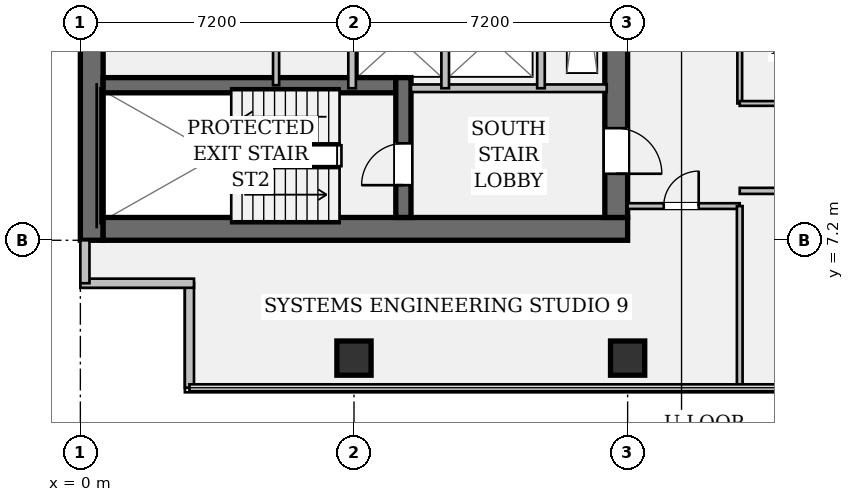
"""IFC4 building model, lengths in metres.
Left out: names, types, materials, properties, quantities, classifications, styles, units other than length and angle.
Written with IfcOpenShell. Run it as: python <this file> out.ifc"""

import sys

from ifc_helpers import new_model, si_unit, direction, frame, frame_2d, origin, origin_2d, place, context, subcontext, project, spatial, rectangle, hollow_rectangle, extrude, element, fill, save


model = new_model("IFC4")
c1 = context("Model", 3, precision=1e-05, world=origin(), true_north=direction((0.0, 1.0)))
c2 = subcontext(c1, "Body", "Model", "MODEL_VIEW")
j1 = project(units=[si_unit("LENGTHUNIT", "METRE"), si_unit("PLANEANGLEUNIT", "RADIAN")], contexts=[c1])
p1 = place(None, origin())
s1 = spatial("IfcSite", under=j1, at=p1, CompositionType="ELEMENT")
p2 = place(p1, origin())
s2 = spatial("IfcBuilding", under=s1, at=p2, CompositionType="ELEMENT")
p3 = place(p2, frame((0.0, 0.0, 125.3)))
s3 = spatial("IfcBuildingStorey", under=s2, at=p3, CompositionType="ELEMENT", Elevation=125.3)
p4 = place(p3, frame((0.3, 7.2, 0.0), z_axis=(0.0, 0.0, 1.0), x_axis=(0.0, 1.0, 0.0)))
e1 = element("IfcWall", 1, at=p4, inside=s3, PredefinedType="SHEAR", context=c2, shape_type="SweptSolid", body=[
    extrude(rectangle(XDim=28.8, YDim=0.6, at=frame_2d((14.4, 0.0))), origin(), (0.0, 0.0, 1.0), 3.58),
])
p5 = place(p3, frame((0.6, 7.5, 0.0), z_axis=(0.0, 0.0, 1.0), x_axis=(1.0, 0.0, 0.0)))
e2 = element("IfcWall", 2, at=p5, inside=s3, PredefinedType="SHEAR", context=c2, shape_type="SweptSolid", body=[
    extrude(rectangle(XDim=13.8, YDim=0.6, at=frame_2d((6.9, 0.0))), origin(), (0.0, 0.0, 1.0), 3.58),
])
p6 = place(p3, frame((14.1, 35.4, 0.0), z_axis=(0.0, 0.0, 1.0), x_axis=(0.0, -1.0, 0.0)))
e3 = element("IfcWall", 3, at=p6, inside=s3, PredefinedType="SHEAR", context=c2, shape_type="SweptSolid", body=[
    extrude(rectangle(XDim=27.6, YDim=0.6, at=frame_2d((13.8, 0.0))), origin(), (0.0, 0.0, 1.0), 3.58),
])
p7 = place(p6, frame((1.3, 0.0, 0.0)))
e4 = element("IfcOpeningElement", 4, at=p7, cuts=e3, PredefinedType="OPENING", context=c2, shape_type="SweptSolid", body=[
    extrude(rectangle(XDim=1.2, YDim=2.15, at=frame_2d((0.6, 1.075))), frame((0.0, 0.312, 0.0), z_axis=(0.0, -1.0, 0.0), x_axis=(1.0, 0.0, 0.0)), (0.0, 0.0, 1.0), 0.624),
])
p8 = place(p6, frame((25.25, 0.0, 0.0)))
e5 = element("IfcOpeningElement", 5, at=p8, cuts=e3, PredefinedType="OPENING", context=c2, shape_type="SweptSolid", body=[
    extrude(rectangle(XDim=1.2, YDim=2.15, at=frame_2d((0.6, 1.075))), frame((0.0, 0.312, 0.0), z_axis=(0.0, -1.0, 0.0), x_axis=(1.0, 0.0, 0.0)), (0.0, 0.0, 1.0), 0.624),
])
p9 = place(p6, frame((14.6, 0.0, 0.0)))
e6 = element("IfcOpeningElement", 6, at=p9, cuts=e3, PredefinedType="OPENING", context=c2, shape_type="SweptSolid", body=[
    extrude(rectangle(XDim=1.6, YDim=2.2, at=frame_2d((0.8, 1.1))), frame((0.0, 0.312, 0.0), z_axis=(0.0, -1.0, 0.0), x_axis=(1.0, 0.0, 0.0)), (0.0, 0.0, 1.0), 0.624),
])
p10 = place(p3, frame((0.6, 11.28, 0.0), z_axis=(0.0, 0.0, 1.0), x_axis=(1.0, 0.0, 0.0)))
e7 = element("IfcWall", 7, at=p10, inside=s3, PredefinedType="SHEAR", context=c2, shape_type="SweptSolid", body=[
    extrude(rectangle(XDim=7.7, YDim=0.4, at=frame_2d((3.85, 0.0))), origin(), (0.0, 0.0, 1.0), 3.58),
])
p11 = place(p3, frame((8.5, 7.8, 0.0), z_axis=(0.0, 0.0, 1.0), x_axis=(0.0, 1.0, 0.0)))
e8 = element("IfcWall", 8, at=p11, inside=s3, PredefinedType="SHEAR", context=c2, shape_type="SweptSolid", body=[
    extrude(rectangle(XDim=3.68, YDim=0.4, at=frame_2d((1.84, 0.0))), origin(), (0.0, 0.0, 1.0), 3.58),
])
p12 = place(p11, frame((0.85, 0.0, 0.0)))
e9 = element("IfcOpeningElement", 9, at=p12, cuts=e8, PredefinedType="OPENING", context=c2, shape_type="SweptSolid", body=[
    extrude(rectangle(XDim=1.1, YDim=2.15, at=frame_2d((0.55, 1.075))), frame((0.0, 0.212, 0.0), z_axis=(0.0, -1.0, 0.0), x_axis=(1.0, 0.0, 0.0)), (0.0, 0.0, 1.0), 0.424),
])
for number, where, z_axis, x_axis in (
    (10, (7.2, 4.1, 0.0), (0.0, 0.0, 1.0), (1.0, 0.0, 0.0)),
    (11, (14.4, 4.1, 0.0), (0.0, 0.0, 1.0), (1.0, 0.0, 0.0)),
):
    element("IfcColumn", number, at=place(p3, frame(where, z_axis=z_axis, x_axis=x_axis)), inside=s3, PredefinedType="COLUMN", context=c2, shape_type="SweptSolid", body=[
        extrude(hollow_rectangle(XDim=0.9, YDim=0.9, WallThickness=0.055, at=origin_2d()), origin(), (0.0, 0.0, 1.0), 3.58),
    ])
p13 = place(p3, frame((2.87, 3.32, 0.0), z_axis=(0.0, 0.0, 1.0), x_axis=(0.0, 1.0, 0.0)))
e12 = element("IfcWall", 12, at=p13, inside=s3, PredefinedType="STANDARD", context=c2, shape_type="SweptSolid", body=[
    extrude(rectangle(XDim=2.75, YDim=0.24, at=frame_2d((1.375, 0.0))), origin(), (0.0, 0.0, 1.0), 3.58),
])
p14 = place(p3, frame((2.99, 6.07, 0.0), z_axis=(0.0, 0.0, 1.0), x_axis=(-1.0, 0.0, 0.0)))
e13 = element("IfcWall", 13, at=p14, inside=s3, PredefinedType="STANDARD", context=c2, shape_type="SweptSolid", body=[
    extrude(rectangle(XDim=2.99, YDim=0.24, at=frame_2d((1.495, 0.0))), origin(), (0.0, 0.0, 1.0), 3.58),
])
p15 = place(p3, frame((0.12, 6.07, 0.0), z_axis=(0.0, 0.0, 1.0), x_axis=(0.0, 1.0, 0.0)))
e14 = element("IfcWall", 14, at=p15, inside=s3, PredefinedType="STANDARD", context=c2, shape_type="SweptSolid", body=[
    extrude(rectangle(XDim=1.13, YDim=0.24, at=frame_2d((0.565, 0.0))), origin(), (0.0, 0.0, 1.0), 3.58),
])
p16 = place(p3, frame((8.7, 11.2, 0.0), z_axis=(0.0, 0.0, 1.0), x_axis=(1.0, 0.0, 0.0)))
e15 = element("IfcWall", 15, at=p16, inside=s3, PredefinedType="PARTITIONING", context=c2, shape_type="SweptSolid", body=[
    extrude(rectangle(XDim=5.15, YDim=0.2, at=frame_2d((2.575, 0.0))), origin(), (0.0, 0.0, 1.0), 3.58),
])
for number, where, z_axis, x_axis in (
    (16, (7.15, 11.2, 0.0), (0.0, 0.0, 1.0), (0.0, 1.0, 0.0)),
    (17, (9.6, 11.2, 0.0), (0.0, 0.0, 1.0), (0.0, 1.0, 0.0)),
):
    element("IfcWall", number, at=place(p3, frame(where, z_axis=z_axis, x_axis=x_axis)), inside=s3, PredefinedType="PARTITIONING", context=c2, shape_type="SweptSolid", body=[
        extrude(rectangle(XDim=2.4, YDim=0.2, at=frame_2d((1.2, 0.0))), origin(), (0.0, 0.0, 1.0), 3.58),
    ])
p17 = place(p3, frame((12.12, 11.2, 0.0), z_axis=(0.0, 0.0, 1.0), x_axis=(0.0, 1.0, 0.0)))
e18 = element("IfcWall", 18, at=p17, inside=s3, PredefinedType="PARTITIONING", context=c2, shape_type="SweptSolid", body=[
    extrude(rectangle(XDim=6.6, YDim=0.2, at=frame_2d((3.3, 0.0))), origin(), (0.0, 0.0, 1.0), 3.58),
])
p18 = place(p17, frame((2.95, 0.0, 0.0)))
e19 = element("IfcOpeningElement", 19, at=p18, cuts=e18, PredefinedType="OPENING", context=c2, shape_type="SweptSolid", body=[
    extrude(rectangle(XDim=0.85, YDim=2.15, at=frame_2d((0.425, 1.075))), frame((0.0, 0.112, 0.0), z_axis=(0.0, -1.0, 0.0), x_axis=(1.0, 0.0, 0.0)), (0.0, 0.0, 1.0), 0.224),
])
p19 = place(p3, frame((5.15, 11.28, 0.0), z_axis=(0.0, 0.0, 1.0), x_axis=(0.0, 1.0, 0.0)))
e20 = element("IfcWall", 20, at=p19, inside=s3, PredefinedType="PARTITIONING", context=c2, shape_type="SweptSolid", body=[
    extrude(rectangle(XDim=4.42, YDim=0.16, at=frame_2d((2.21, 0.0))), origin(), (0.0, 0.0, 1.0), 3.58),
])
p20 = place(p3, frame((14.4, 8.1, 0.0), z_axis=(0.0, 0.0, 1.0), x_axis=(1.0, 0.0, 0.0)))
e21 = element("IfcWall", 21, at=p20, inside=s3, PredefinedType="PARTITIONING", context=c2, shape_type="SweptSolid", body=[
    extrude(rectangle(XDim=2.95, YDim=0.15, at=frame_2d((1.475, 0.0))), origin(), (0.0, 0.0, 1.0), 3.098),
])
p21 = place(p20, frame((0.95, 0.0, 0.0)))
e22 = element("IfcOpeningElement", 22, at=p21, cuts=e21, PredefinedType="OPENING", context=c2, shape_type="SweptSolid", body=[
    extrude(rectangle(XDim=0.92, YDim=2.15, at=frame_2d((0.46, 1.075))), frame((0.0, 0.087, 0.0), z_axis=(0.0, -1.0, 0.0), x_axis=(1.0, 0.0, 0.0)), (0.0, 0.0, 1.0), 0.174),
])
p22 = place(p3, frame((17.35, 8.5, 0.0), z_axis=(0.0, 0.0, 1.0), x_axis=(1.0, 0.0, 0.0)))
e23 = element("IfcWall", 23, at=p22, inside=s3, PredefinedType="PARTITIONING", context=c2, shape_type="SweptSolid", body=[
    extrude(rectangle(XDim=24.15, YDim=0.16, at=frame_2d((12.075, 0.0))), origin(), (0.0, 0.0, 1.0), 2.869),
])
p23 = place(p22, frame((5.23, 0.0, 0.0)))
e24 = element("IfcOpeningElement", 24, at=p23, cuts=e23, PredefinedType="OPENING", context=c2, shape_type="SweptSolid", body=[
    extrude(rectangle(XDim=0.92, YDim=2.15, at=frame_2d((0.46, 1.075))), frame((0.0, 0.092, 0.0), z_axis=(0.0, -1.0, 0.0), x_axis=(1.0, 0.0, 0.0)), (0.0, 0.0, 1.0), 0.184),
])
p24 = place(p22, frame((16.82, 0.0, 0.0)))
e25 = element("IfcOpeningElement", 25, at=p24, cuts=e23, PredefinedType="OPENING", context=c2, shape_type="SweptSolid", body=[
    extrude(rectangle(XDim=0.92, YDim=2.15, at=frame_2d((0.46, 1.075))), frame((0.0, 0.092, 0.0), z_axis=(0.0, -1.0, 0.0), x_axis=(1.0, 0.0, 0.0)), (0.0, 0.0, 1.0), 0.184),
])
p25 = place(p3, frame((17.35, 10.8, 0.0), z_axis=(0.0, 0.0, 1.0), x_axis=(0.0, 1.0, 0.0)))
e26 = element("IfcWall", 26, at=p25, inside=s3, PredefinedType="PARTITIONING", context=c2, shape_type="SweptSolid", body=[
    extrude(rectangle(XDim=7.55, YDim=0.125, at=frame_2d((3.775, 0.0))), origin(), (0.0, 0.0, 1.0), 2.869),
])
p26 = place(p3, frame((17.35, 10.8, 0.0), z_axis=(0.0, 0.0, 1.0), x_axis=(1.0, 0.0, 0.0)))
e27 = element("IfcWall", 27, at=p26, inside=s3, PredefinedType="PARTITIONING", context=c2, shape_type="SweptSolid", body=[
    extrude(rectangle(XDim=21.8, YDim=0.125, at=frame_2d((10.9, 0.0))), origin(), (0.0, 0.0, 1.0), 2.869),
])
p27 = place(p3, frame((17.35, 3.32, 0.0), z_axis=(0.0, 0.0, 1.0), x_axis=(0.0, 1.0, 0.0)))
e28 = element("IfcWall", 28, at=p27, inside=s3, PredefinedType="PARTITIONING", context=c2, shape_type="SweptSolid", body=[
    extrude(rectangle(XDim=4.78, YDim=0.15, at=frame_2d((2.39, 0.0))), origin(), (0.0, 0.0, 1.0), 2.869),
])
p28 = place(p12, origin())
e29 = element("IfcDoor", 29, at=p28, inside=s3, OperationType="SINGLE_SWING_LEFT", PredefinedType="DOOR", context=c2, shape_type="SweptSolid", body=[
    extrude(rectangle(XDim=1.1, YDim=2.15, at=frame_2d((0.55, 1.075))), frame((0.0, 0.025, 0.0), z_axis=(0.0, -1.0, 0.0), x_axis=(1.0, 0.0, 0.0)), (0.0, 0.0, 1.0), 0.05),
])
fill(e9, e29)
p29 = place(p8, origin())
e30 = element("IfcDoor", 30, at=p29, inside=s3, OperationType="SINGLE_SWING_RIGHT", PredefinedType="DOOR", context=c2, shape_type="SweptSolid", body=[
    extrude(rectangle(XDim=1.2, YDim=2.15, at=frame_2d((0.6, 1.075))), frame((0.0, 0.025, 0.0), z_axis=(0.0, -1.0, 0.0), x_axis=(1.0, 0.0, 0.0)), (0.0, 0.0, 1.0), 0.05),
])
fill(e5, e30)
p30 = place(p21, origin())
e31 = element("IfcDoor", 31, at=p30, inside=s3, OperationType="SINGLE_SWING_RIGHT", PredefinedType="DOOR", context=c2, shape_type="SweptSolid", body=[
    extrude(rectangle(XDim=0.92, YDim=2.15, at=frame_2d((0.46, 1.075))), frame((0.0, 0.025, 0.0), z_axis=(0.0, -1.0, 0.0), x_axis=(1.0, 0.0, 0.0)), (0.0, 0.0, 1.0), 0.05),
])
fill(e22, e31)
save(model, sys.argv[1])
